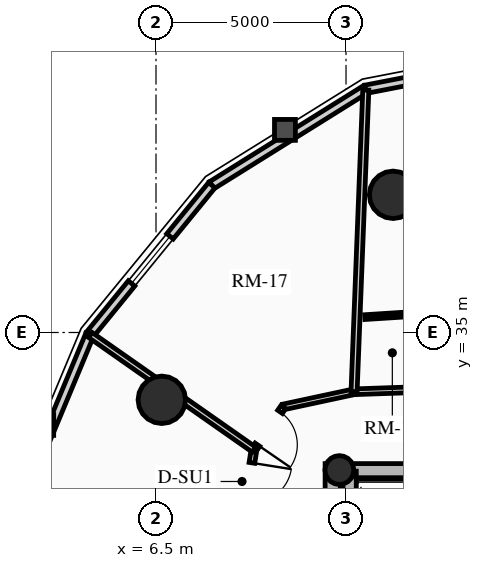
"""IFC4 building model, lengths in metres.
Left out: names, types, materials, properties, quantities, classifications, styles, units other than length and angle.
Written with IfcOpenShell. Run it as: python <this file> out.ifc"""

import sys

from ifc_helpers import new_model, si_unit, direction, frame, frame_2d, origin, origin_2d, place, context, subcontext, project, spatial, rectangle, circle, hollow_circle, extrude, source, transform, mapped, element, fill, save


model = new_model("IFC4")
c1 = context("Model", 3, precision=1e-05, world=origin(), true_north=direction((0.0, 1.0)))
c2 = subcontext(c1, "Body", "Model", "MODEL_VIEW")
j1 = project(units=[si_unit("LENGTHUNIT", "METRE"), si_unit("PLANEANGLEUNIT", "RADIAN")], contexts=[c1])
p1 = place(None, origin())
s1 = spatial("IfcSite", under=j1, at=p1, CompositionType="ELEMENT")
p2 = place(p1, origin())
s2 = spatial("IfcBuilding", under=s1, at=p2, CompositionType="ELEMENT")
p3 = place(p2, frame((0.0, 0.0, 154.51)))
s3 = spatial("IfcBuildingStorey", under=s2, at=p3, CompositionType="ELEMENT", Elevation=154.51)
p4 = place(p3, frame((11.15, 17.45, 0.0), z_axis=(0.0, 0.0, 1.0), x_axis=(0.0, 1.0, 0.0)))
e1 = element("IfcWall", 1, at=p4, inside=s3, PredefinedType="SHEAR", context=c2, shape_type="SweptSolid", body=[
    extrude(rectangle(XDim=14.1, YDim=0.4, at=frame_2d((7.05, 0.0))), origin(), (0.0, 0.0, 1.0), 2.91),
])
p5 = place(p3, frame((11.15, 31.35, 0.0), z_axis=(0.0, 0.0, 1.0), x_axis=(1.0, 0.0, 0.0)))
e2 = element("IfcWall", 2, at=p5, inside=s3, PredefinedType="SHEAR", context=c2, shape_type="SweptSolid", body=[
    extrude(rectangle(XDim=10.7, YDim=0.4, at=frame_2d((5.35, 0.0))), origin(), (0.0, 0.0, 1.0), 2.91),
])
m1 = source(origin(), c2, "Body", "SweptSolid", [
    extrude(rectangle(XDim=1.5, YDim=2.02, at=frame_2d((0.75, 1.01))), frame((0.0, 0.21, 0.0), z_axis=(0.0, -1.0, 0.0), x_axis=(1.0, 0.0, 0.0)), (0.0, 0.0, 1.0), 0.42),
])
p6 = place(p5, frame((4.6, 0.0, 0.0)))
e3 = element("IfcOpeningElement", 3, at=p6, cuts=e2, PredefinedType="OPENING", context=c2, shape_type="MappedRepresentation", body=[
    mapped(m1, transform((0.0, 0.0, 0.0), x_axis=(1.0, 0.0, 0.0), y_axis=(0.0, 1.0, 0.0), z_axis=(0.0, 0.0, 1.0), scale=1.0)),
])
p7 = place(p3, frame((11.595, 24.655, 0.0), z_axis=(0.0, 0.0, 1.0), x_axis=(0.0, 1.0, 0.0)))
e4 = element("IfcWall", 4, at=p7, inside=s3, PredefinedType="SHEAR", context=c2, shape_type="SweptSolid", body=[
    extrude(rectangle(XDim=6.695, YDim=0.35, at=frame_2d((3.348, 0.0))), origin(), (0.0, 0.0, 1.0), 2.91),
])
p8 = place(p3, frame((11.325, 31.38, 0.0), z_axis=(0.0, 0.0, 1.0), x_axis=(1.0, 0.0, 0.0)))
e5 = element("IfcColumn", 5, at=p8, inside=s3, PredefinedType="COLUMN", context=c2, shape_type="SweptSolid", body=[
    extrude(hollow_circle(Radius=0.38, WallThickness=0.032, at=origin_2d()), origin(), (0.0, 0.0, 1.0), 2.91),
])
for number, where, z_axis, x_axis in (
    (6, (12.739, 38.623, 0.0), (0.0, 0.0, 1.0), (1.0, 0.0, 0.0)),
    (7, (6.653, 33.229, 0.0), (0.0, 0.0, 1.0), (1.0, 0.0, 0.0)),
):
    element("IfcColumn", number, at=place(p3, frame(where, z_axis=z_axis, x_axis=x_axis)), inside=s3, PredefinedType="USERDEFINED", context=c2, shape_type="SweptSolid", body=[
        extrude(circle(Radius=0.625, at=origin_2d()), origin(), (0.0, 0.0, 1.0), 2.91),
    ])
p9 = place(p3, frame((12.015, 41.4, 0.0), z_axis=(0.0, 0.0, 1.0), x_axis=(0.981718699963, 0.190337579429, 0.0)))
e8 = element("IfcWall", 8, at=p9, inside=s3, PredefinedType="SOLIDWALL", context=c2, shape_type="SweptSolid", body=[
    extrude(rectangle(XDim=4.569, YDim=0.22, at=frame_2d((2.284, 0.0))), origin(), (0.0, 0.0, 1.0), 2.245),
])
m2 = source(origin(), c2, "Body", "SweptSolid", [
    extrude(rectangle(XDim=1.6, YDim=1.3, at=frame_2d((0.8, 0.65))), frame((0.0, 0.12, 0.0), z_axis=(0.0, -1.0, 0.0), x_axis=(1.0, 0.0, 0.0)), (0.0, 0.0, 1.0), 0.24),
])
p10 = place(p9, frame((1.484, 0.0, 0.65)))
e9 = element("IfcOpeningElement", 9, at=p10, cuts=e8, PredefinedType="OPENING", context=c2, shape_type="MappedRepresentation", body=[
    mapped(m2, transform((0.0, 0.0, 0.0), x_axis=(1.0, 0.0, 0.0), y_axis=(0.0, 1.0, 0.0), z_axis=(0.0, 0.0, 1.0), scale=1.0)),
])
p11 = place(p3, frame((7.968, 38.876, 0.0), z_axis=(0.0, 0.0, 1.0), x_axis=(0.848452391194, 0.529271707044, 0.0)))
e10 = element("IfcWall", 10, at=p11, inside=s3, PredefinedType="SOLIDWALL", context=c2, shape_type="SweptSolid", body=[
    extrude(rectangle(XDim=4.769, YDim=0.22, at=frame_2d((2.385, 0.0))), origin(), (0.0, 0.0, 1.0), 2.245),
])
p12 = place(p3, frame((4.757, 34.945, 0.0), z_axis=(0.0, 0.0, 1.0), x_axis=(0.632598524901, 0.774479894053, 0.0)))
e11 = element("IfcWall", 11, at=p12, inside=s3, PredefinedType="SOLIDWALL", context=c2, shape_type="SweptSolid", body=[
    extrude(rectangle(XDim=5.076, YDim=0.22, at=frame_2d((2.538, 0.0))), origin(), (0.0, 0.0, 1.0), 2.245),
])
p13 = place(p12, frame((1.738, 0.0, 0.65)))
e12 = element("IfcOpeningElement", 12, at=p13, cuts=e11, PredefinedType="OPENING", context=c2, shape_type="MappedRepresentation", body=[
    mapped(m2, transform((0.0, 0.0, 0.0), x_axis=(1.0, 0.0, 0.0), y_axis=(0.0, 1.0, 0.0), z_axis=(0.0, 0.0, 1.0), scale=1.0)),
])
p14 = place(p3, frame((2.695, 29.991, 0.0), z_axis=(0.0, 0.0, 1.0), x_axis=(0.384259959969, 0.923224936386, 0.0)))
e13 = element("IfcWall", 13, at=p14, inside=s3, PredefinedType="SOLIDWALL", context=c2, shape_type="SweptSolid", body=[
    extrude(rectangle(XDim=5.365, YDim=0.22, at=frame_2d((2.683, 0.0))), origin(), (0.0, 0.0, 1.0), 2.245),
])
p15 = place(p3, frame((18.112, 33.659, 0.0), z_axis=(0.0, 0.0, 1.0), x_axis=(-0.999413895918, -0.034232508622, 0.0)))
e14 = element("IfcWall", 14, at=p15, inside=s3, PredefinedType="PARTITIONING", context=c2, shape_type="SweptSolid", body=[
    extrude(rectangle(XDim=6.404, YDim=0.15, at=frame_2d((3.202, 0.0))), origin(), (0.0, 0.0, 1.0), 2.245),
])
p16 = place(p3, frame((11.712, 33.44, 0.0), z_axis=(0.0, 0.0, 1.0), x_axis=(-0.977753514213, -0.209757158265, 0.0)))
e15 = element("IfcWall", 15, at=p16, inside=s3, PredefinedType="PARTITIONING", context=c2, shape_type="SweptSolid", body=[
    extrude(rectangle(XDim=1.901, YDim=0.15, at=frame_2d((0.95, 0.0))), origin(), (0.0, 0.0, 1.0), 2.245),
])
p17 = place(p3, frame((9.853, 33.042, 0.0), z_axis=(0.0, 0.0, 1.0), x_axis=(-0.567189283521, -0.823587467522, 0.0)))
e16 = element("IfcWall", 16, at=p17, inside=s3, PredefinedType="PARTITIONING", context=c2, shape_type="SweptSolid", body=[
    extrude(rectangle(XDim=1.365, YDim=0.15, at=frame_2d((0.682, 0.0))), origin(), (0.0, 0.0, 1.0), 2.245),
])
m3 = source(origin(), c2, "Body", "SweptSolid", [
    extrude(rectangle(XDim=1.05, YDim=2.015, at=frame_2d((0.525, 1.007))), frame((0.0, 0.085, 0.0), z_axis=(0.0, -1.0, 0.0), x_axis=(1.0, 0.0, 0.0)), (0.0, 0.0, 1.0), 0.17),
])
p18 = place(p17, frame((0.157, 0.0, 0.0)))
e17 = element("IfcOpeningElement", 17, at=p18, cuts=e16, PredefinedType="OPENING", context=c2, shape_type="MappedRepresentation", body=[
    mapped(m3, transform((0.0, 0.0, 0.0), x_axis=(1.0, 0.0, 0.0), y_axis=(0.0, 1.0, 0.0), z_axis=(0.0, 0.0, 1.0), scale=1.0)),
])
p19 = place(p3, frame((9.079, 31.918, 0.0), z_axis=(0.0, 0.0, 1.0), x_axis=(-0.15742775293, -0.987530507178, 0.0)))
e18 = element("IfcWall", 18, at=p19, inside=s3, PredefinedType="PARTITIONING", context=c2, shape_type="SweptSolid", body=[
    extrude(rectangle(XDim=1.523, YDim=0.15, at=frame_2d((0.761, 0.0))), origin(), (0.0, 0.0, 1.0), 2.245),
])
p20 = place(p19, frame((0.353, 0.0, 0.0)))
e19 = element("IfcOpeningElement", 19, at=p20, cuts=e18, PredefinedType="OPENING", context=c2, shape_type="MappedRepresentation", body=[
    mapped(m3, transform((0.0, 0.0, 0.0), x_axis=(1.0, 0.0, 0.0), y_axis=(0.0, 1.0, 0.0), z_axis=(0.0, 0.0, 1.0), scale=1.0)),
])
p21 = place(p3, frame((11.712, 33.44, 0.0), z_axis=(0.0, 0.0, 1.0), x_axis=(0.038892064024, 0.999243417469, 0.0)))
e20 = element("IfcWall", 20, at=p21, inside=s3, PredefinedType="PARTITIONING", context=c2, shape_type="SweptSolid", body=[
    extrude(rectangle(XDim=7.947, YDim=0.16, at=frame_2d((3.974, 0.0))), origin(), (0.0, 0.0, 1.0), 2.245),
])
p22 = place(p3, frame((9.079, 31.918, 0.0), z_axis=(0.0, 0.0, 1.0), x_axis=(-0.819135909075, 0.573599479135, 0.0)))
e21 = element("IfcWall", 21, at=p22, inside=s3, PredefinedType="PARTITIONING", context=c2, shape_type="SweptSolid", body=[
    extrude(rectangle(XDim=5.257, YDim=0.16, at=frame_2d((2.628, 0.0))), origin(), (0.0, 0.0, 1.0), 2.245),
])
p23 = place(p3, frame((14.841, 35.586, 0.0), z_axis=(0.0, 0.0, 1.0), x_axis=(-0.997963636416, -0.063785424599, 0.0)))
e22 = element("IfcWall", 22, at=p23, inside=s3, PredefinedType="PARTITIONING", context=c2, shape_type="SweptSolid", body=[
    extrude(rectangle(XDim=2.852, YDim=0.125, at=frame_2d((1.426, 0.0))), origin(), (0.0, 0.0, 1.0), 2.245),
])
m4 = source(origin(), c2, "Body", "SweptSolid", [
    extrude(rectangle(XDim=0.9, YDim=2.005, at=frame_2d((0.45, 1.002))), frame((0.0, 0.073, 0.0), z_axis=(0.0, -1.0, 0.0), x_axis=(1.0, 0.0, 0.0)), (0.0, 0.0, 1.0), 0.145),
])
p24 = place(p23, frame((0.12, 0.0, 0.0)))
e23 = element("IfcOpeningElement", 23, at=p24, cuts=e22, PredefinedType="OPENING", context=c2, shape_type="MappedRepresentation", body=[
    mapped(m4, transform((0.0, 0.0, 0.0), x_axis=(1.0, 0.0, 0.0), y_axis=(0.0, 1.0, 0.0), z_axis=(0.0, 0.0, 1.0), scale=1.0)),
])
m5 = source(origin(), c2, "Body", "SweptSolid", [
    extrude(rectangle(XDim=1.6, YDim=1.3, at=frame_2d((0.8, 0.65))), frame((0.0, 0.03, 0.0), z_axis=(0.0, -1.0, 0.0), x_axis=(1.0, 0.0, 0.0)), (0.0, 0.0, 1.0), 0.06),
])
p25 = place(p13, origin())
e24 = element("IfcWindow", 24, at=p25, inside=s3, PartitioningType="SINGLE_PANEL", PredefinedType="WINDOW", context=c2, shape_type="MappedRepresentation", body=[
    mapped(m5, transform((0.0, 0.0, 0.0), x_axis=(1.0, 0.0, 0.0), y_axis=(0.0, 1.0, 0.0), z_axis=(0.0, 0.0, 1.0), scale=1.0)),
])
fill(e12, e24)
m6 = source(origin(), c2, "Body", "SweptSolid", [
    extrude(rectangle(XDim=1.05, YDim=2.015, at=frame_2d((0.525, 1.007))), frame((0.0, 0.025, 0.0), z_axis=(0.0, -1.0, 0.0), x_axis=(1.0, 0.0, 0.0)), (0.0, 0.0, 1.0), 0.05),
])
p26 = place(p18, origin())
e25 = element("IfcDoor", 25, at=p26, inside=s3, OperationType="SINGLE_SWING_RIGHT", PredefinedType="DOOR", context=c2, shape_type="MappedRepresentation", body=[
    mapped(m6, transform((0.0, 0.0, 0.0), x_axis=(1.0, 0.0, 0.0), y_axis=(0.0, 1.0, 0.0), z_axis=(0.0, 0.0, 1.0), scale=1.0)),
])
fill(e17, e25)
p27 = place(p20, origin())
e26 = element("IfcDoor", 26, at=p27, inside=s3, OperationType="SINGLE_SWING_LEFT", PredefinedType="DOOR", context=c2, shape_type="MappedRepresentation", body=[
    mapped(m6, transform((0.0, 0.0, 0.0), x_axis=(1.0, 0.0, 0.0), y_axis=(0.0, 1.0, 0.0), z_axis=(0.0, 0.0, 1.0), scale=1.0)),
])
fill(e19, e26)
save(model, sys.argv[1])
